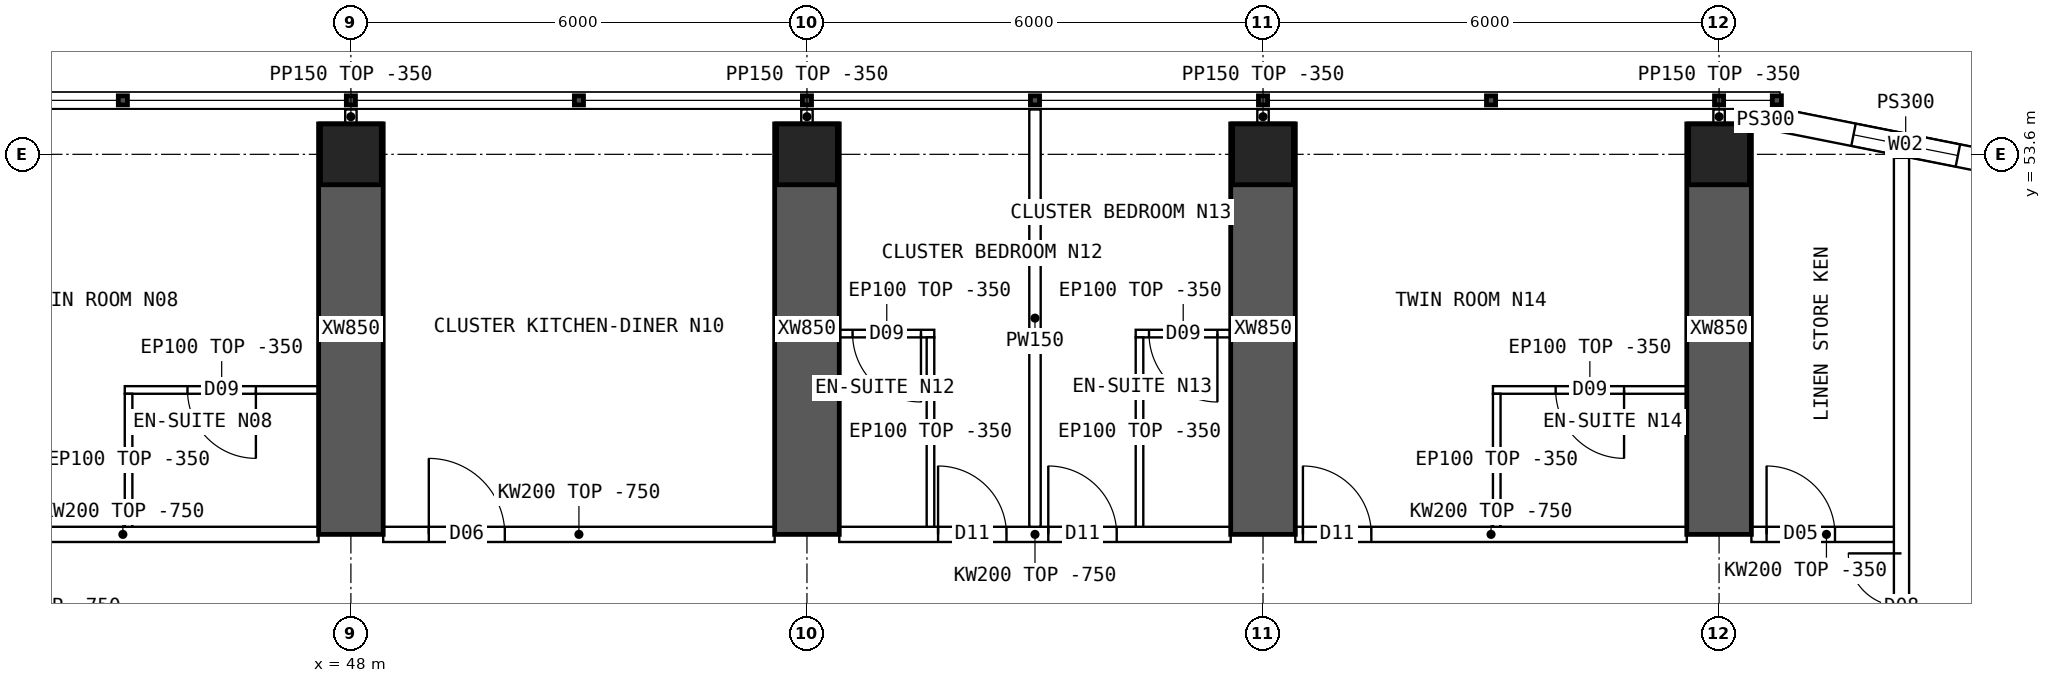
"""IFC4 building model, lengths in metres.
Left out: names, types, materials, properties, quantities, classifications, styles, units other than length and angle.
Written with IfcOpenShell. Run it as: python <this file> out.ifc"""

import sys

from ifc_helpers import new_model, si_unit, direction, frame, frame_2d, origin, origin_2d, place, context, subcontext, project, spatial, polyline, rectangle, hollow_rectangle, outline, extrude, element, fill, save


model = new_model("IFC4")
c1 = context("Model", 3, precision=1e-05, world=origin(), true_north=direction((0.0, 1.0)))
c2 = subcontext(c1, "Body", "Model", "MODEL_VIEW")
j1 = project(units=[si_unit("LENGTHUNIT", "METRE"), si_unit("PLANEANGLEUNIT", "RADIAN")], contexts=[c1])
p1 = place(None, origin())
s1 = spatial("IfcSite", under=j1, at=p1, CompositionType="ELEMENT")
p2 = place(p1, origin())
s2 = spatial("IfcBuilding", under=s1, at=p2, CompositionType="ELEMENT")
p3 = place(p2, frame((0.0, 0.0, 197.35)))
s3 = spatial("IfcBuildingStorey", under=s2, at=p3, CompositionType="ELEMENT", Elevation=197.35)
for number, where, z_axis, x_axis in (
    (1, (48.0, 53.6, 0.0), (0.0, 0.0, 1.0), (1.0, 0.0, 0.0)),
    (2, (54.0, 53.6, 0.0), (0.0, 0.0, 1.0), (1.0, 0.0, 0.0)),
    (3, (60.0, 53.6, 0.0), (0.0, 0.0, 1.0), (1.0, 0.0, 0.0)),
    (4, (66.0, 53.6, 0.0), (0.0, 0.0, 1.0), (1.0, 0.0, 0.0)),
):
    element("IfcColumn", number, at=place(p3, frame(where, z_axis=z_axis, x_axis=x_axis)), inside=s3, PredefinedType="COLUMN", context=c2, shape_type="SweptSolid", body=[
        extrude(hollow_rectangle(XDim=0.8, YDim=0.8, WallThickness=0.08, at=origin_2d()), origin(), (0.0, 0.0, 1.0), 3.75),
    ])
for number, where, z_axis, x_axis in (
    (5, (48.0, 48.6, 0.0), (0.0, 0.0, 1.0), (0.0, 1.0, 0.0)),
    (6, (54.0, 48.6, 0.0), (0.0, 0.0, 1.0), (0.0, 1.0, 0.0)),
    (7, (60.0, 48.6, 0.0), (0.0, 0.0, 1.0), (0.0, 1.0, 0.0)),
    (8, (66.0, 48.6, 0.0), (0.0, 0.0, 1.0), (0.0, 1.0, 0.0)),
):
    element("IfcWall", number, at=place(p3, frame(where, z_axis=z_axis, x_axis=x_axis)), inside=s3, PredefinedType="SHEAR", context=c2, shape_type="SweptSolid", body=[
        extrude(rectangle(XDim=5.4, YDim=0.85, at=frame_2d((2.7, 0.0))), origin(), (0.0, 0.0, 1.0), 3.75),
    ])
p4 = place(p3, frame((70.11, 53.392, 0.0), z_axis=(0.0, 0.0, 1.0), x_axis=(-0.98078325777, 0.195100490205, 0.0)))
e9 = element("IfcWall", 9, at=p4, inside=s3, PredefinedType="SOLIDWALL", context=c2, shape_type="SweptSolid", body=[
    extrude(outline(polyline([(-0.03, -0.15), (3.405, -0.15), (3.345, 0.15), (0.03, 0.15), (-0.03, -0.15)])), origin(), (0.0, 0.0, 1.0), 3.4),
])
p5 = place(p4, frame((0.988, 0.0, 0.9)))
e10 = element("IfcOpeningElement", 10, at=p5, cuts=e9, PredefinedType="OPENING", context=c2, shape_type="SweptSolid", body=[
    extrude(rectangle(XDim=1.4, YDim=1.8, at=frame_2d((0.7, 0.9))), frame((0.0, 0.16, 0.0), z_axis=(0.0, -1.0, 0.0), x_axis=(1.0, 0.0, 0.0)), (0.0, 0.0, 1.0), 0.32),
])
p6 = place(p3, frame((66.8, 54.05, 0.0), z_axis=(0.0, 0.0, 1.0), x_axis=(-1.0, 0.0, 0.0)))
e11 = element("IfcWall", 11, at=p6, inside=s3, PredefinedType="SOLIDWALL", context=c2, shape_type="SweptSolid", body=[
    extrude(rectangle(XDim=0.375, YDim=0.3, at=frame_2d((0.188, 0.0))), origin(), (0.0, 0.0, 1.0), 3.4),
])
p7 = place(p3, frame((42.425, 48.6, 0.0), z_axis=(0.0, 0.0, 1.0), x_axis=(1.0, 0.0, 0.0)))
e12 = element("IfcWall", 12, at=p7, inside=s3, PredefinedType="SOLIDWALL", context=c2, shape_type="SweptSolid", body=[
    extrude(outline(polyline([(0.0, 0.0), (5.15, 0.0), (5.15, 3.0), (0.0, 3.0), (0.0, 0.0)])), frame((0.0, 0.1, 0.0), z_axis=(0.0, -1.0, 0.0), x_axis=(1.0, 0.0, 0.0)), (0.0, 0.0, 1.0), 0.2),
])
p8 = place(p7, frame((0.1, 0.0, 0.0)))
e13 = element("IfcOpeningElement", 13, at=p8, cuts=e12, PredefinedType="OPENING", context=c2, shape_type="SweptSolid", body=[
    extrude(rectangle(XDim=0.9, YDim=2.1, at=frame_2d((0.45, 1.05))), frame((0.0, 0.11, 0.0), z_axis=(0.0, -1.0, 0.0), x_axis=(1.0, 0.0, 0.0)), (0.0, 0.0, 1.0), 0.22),
])
p9 = place(p3, frame((48.425, 48.6, 0.0), z_axis=(0.0, 0.0, 1.0), x_axis=(1.0, 0.0, 0.0)))
e14 = element("IfcWall", 14, at=p9, inside=s3, PredefinedType="SOLIDWALL", context=c2, shape_type="SweptSolid", body=[
    extrude(outline(polyline([(0.0, 0.0), (5.15, 0.0), (5.15, 3.0), (0.0, 3.0), (0.0, 0.0)])), frame((0.0, 0.1, 0.0), z_axis=(0.0, -1.0, 0.0), x_axis=(1.0, 0.0, 0.0)), (0.0, 0.0, 1.0), 0.2),
])
p10 = place(p9, frame((0.6, 0.0, 0.0)))
e15 = element("IfcOpeningElement", 15, at=p10, cuts=e14, PredefinedType="OPENING", context=c2, shape_type="SweptSolid", body=[
    extrude(rectangle(XDim=1.0, YDim=2.1, at=frame_2d((0.5, 1.05))), frame((0.0, 0.11, 0.0), z_axis=(0.0, -1.0, 0.0), x_axis=(1.0, 0.0, 0.0)), (0.0, 0.0, 1.0), 0.22),
])
p11 = place(p3, frame((54.425, 48.6, 0.0), z_axis=(0.0, 0.0, 1.0), x_axis=(1.0, 0.0, 0.0)))
e16 = element("IfcWall", 16, at=p11, inside=s3, PredefinedType="SOLIDWALL", context=c2, shape_type="SweptSolid", body=[
    extrude(outline(polyline([(0.0, 0.0), (5.15, 0.0), (5.15, 3.0), (0.0, 3.0), (0.0, 0.0)])), frame((0.0, 0.1, 0.0), z_axis=(0.0, -1.0, 0.0), x_axis=(1.0, 0.0, 0.0)), (0.0, 0.0, 1.0), 0.2),
])
p12 = place(p11, frame((1.3, 0.0, 0.0)))
e17 = element("IfcOpeningElement", 17, at=p12, cuts=e16, PredefinedType="OPENING", context=c2, shape_type="SweptSolid", body=[
    extrude(rectangle(XDim=0.9, YDim=2.1, at=frame_2d((0.45, 1.05))), frame((0.0, 0.11, 0.0), z_axis=(0.0, -1.0, 0.0), x_axis=(1.0, 0.0, 0.0)), (0.0, 0.0, 1.0), 0.22),
])
p13 = place(p11, frame((2.75, 0.0, 0.0)))
e18 = element("IfcOpeningElement", 18, at=p13, cuts=e16, PredefinedType="OPENING", context=c2, shape_type="SweptSolid", body=[
    extrude(rectangle(XDim=0.9, YDim=2.1, at=frame_2d((0.45, 1.05))), frame((0.0, 0.11, 0.0), z_axis=(0.0, -1.0, 0.0), x_axis=(1.0, 0.0, 0.0)), (0.0, 0.0, 1.0), 0.22),
])
p14 = place(p3, frame((60.425, 48.6, 0.0), z_axis=(0.0, 0.0, 1.0), x_axis=(1.0, 0.0, 0.0)))
e19 = element("IfcWall", 19, at=p14, inside=s3, PredefinedType="SOLIDWALL", context=c2, shape_type="SweptSolid", body=[
    extrude(outline(polyline([(0.0, 0.0), (5.15, 0.0), (5.15, 3.0), (0.0, 3.0), (0.0, 0.0)])), frame((0.0, 0.1, 0.0), z_axis=(0.0, -1.0, 0.0), x_axis=(1.0, 0.0, 0.0)), (0.0, 0.0, 1.0), 0.2),
])
p15 = place(p14, frame((0.1, 0.0, 0.0)))
e20 = element("IfcOpeningElement", 20, at=p15, cuts=e19, PredefinedType="OPENING", context=c2, shape_type="SweptSolid", body=[
    extrude(rectangle(XDim=0.9, YDim=2.1, at=frame_2d((0.45, 1.05))), frame((0.0, 0.11, 0.0), z_axis=(0.0, -1.0, 0.0), x_axis=(1.0, 0.0, 0.0)), (0.0, 0.0, 1.0), 0.22),
])
p16 = place(p3, frame((66.425, 48.6, 0.0), z_axis=(0.0, 0.0, 1.0), x_axis=(1.0, 0.0, 0.0)))
e21 = element("IfcWall", 21, at=p16, inside=s3, PredefinedType="SOLIDWALL", context=c2, shape_type="SweptSolid", body=[
    extrude(rectangle(XDim=1.975, YDim=0.2, at=frame_2d((0.987, 0.0))), origin(), (0.0, 0.0, 1.0), 3.4),
])
p17 = place(p16, frame((0.2, 0.0, 0.0)))
e22 = element("IfcOpeningElement", 22, at=p17, cuts=e21, PredefinedType="OPENING", context=c2, shape_type="SweptSolid", body=[
    extrude(rectangle(XDim=0.9, YDim=2.1, at=frame_2d((0.45, 1.05))), frame((0.0, 0.11, 0.0), z_axis=(0.0, -1.0, 0.0), x_axis=(1.0, 0.0, 0.0)), (0.0, 0.0, 1.0), 0.22),
])
p18 = place(p3, frame((45.025, 50.5, 0.0), z_axis=(0.0, 0.0, 1.0), x_axis=(1.0, 0.0, 0.0)))
e23 = element("IfcWall", 23, at=p18, inside=s3, PredefinedType="PARTITIONING", context=c2, shape_type="SweptSolid", body=[
    extrude(rectangle(XDim=2.55, YDim=0.1, at=frame_2d((1.275, 0.0))), origin(), (0.0, 0.0, 1.0), 3.4),
])
p19 = place(p18, frame((0.825, 0.0, 0.0)))
e24 = element("IfcOpeningElement", 24, at=p19, cuts=e23, PredefinedType="OPENING", context=c2, shape_type="SweptSolid", body=[
    extrude(rectangle(XDim=0.9, YDim=2.1, at=frame_2d((0.45, 1.05))), frame((0.0, 0.06, 0.0), z_axis=(0.0, -1.0, 0.0), x_axis=(1.0, 0.0, 0.0)), (0.0, 0.0, 1.0), 0.12),
])
p20 = place(p3, frame((45.075, 50.45, 0.0), z_axis=(0.0, 0.0, 1.0), x_axis=(0.0, -1.0, 0.0)))
e25 = element("IfcWall", 25, at=p20, inside=s3, PredefinedType="PARTITIONING", context=c2, shape_type="SweptSolid", body=[
    extrude(outline(polyline([(0.0, 0.0), (1.75, 0.0), (1.75, 3.0), (1.702, 3.0), (1.7, 3.4), (0.0, 3.4), (0.0, 0.0)])), frame((0.0, 0.05, 0.0), z_axis=(0.0, -1.0, 0.0), x_axis=(1.0, 0.0, 0.0)), (0.0, 0.0, 1.0), 0.1),
])
p21 = place(p3, frame((57.0, 54.19, 0.0), z_axis=(0.0, 0.0, 1.0), x_axis=(0.0, -1.0, 0.0)))
e26 = element("IfcWall", 26, at=p21, inside=s3, PredefinedType="PARTITIONING", context=c2, shape_type="SweptSolid", body=[
    extrude(outline(polyline([(0.0, 0.0), (5.49, 0.0), (5.49, 3.0), (5.442, 3.0), (5.44, 3.4), (0.792, 3.4), (0.79, 3.0), (0.392, 3.0), (0.39, 3.4), (0.0, 3.4), (0.0, 0.0)])), frame((0.0, 0.075, 0.0), z_axis=(0.0, -1.0, 0.0), x_axis=(1.0, 0.0, 0.0)), (0.0, 0.0, 1.0), 0.15),
])
p22 = place(p3, frame((54.425, 51.242, 0.0), z_axis=(0.0, 0.0, 1.0), x_axis=(1.0, 0.0, 0.0)))
e27 = element("IfcWall", 27, at=p22, inside=s3, PredefinedType="PARTITIONING", context=c2, shape_type="SweptSolid", body=[
    extrude(rectangle(XDim=1.25, YDim=0.1, at=frame_2d((0.625, 0.0))), origin(), (0.0, 0.0, 1.0), 3.4),
])
p23 = place(p22, frame((0.175, 0.0, 0.0)))
e28 = element("IfcOpeningElement", 28, at=p23, cuts=e27, PredefinedType="OPENING", context=c2, shape_type="SweptSolid", body=[
    extrude(rectangle(XDim=0.9, YDim=2.1, at=frame_2d((0.45, 1.05))), frame((0.0, 0.06, 0.0), z_axis=(0.0, -1.0, 0.0), x_axis=(1.0, 0.0, 0.0)), (0.0, 0.0, 1.0), 0.12),
])
p24 = place(p3, frame((55.625, 51.192, 0.0), z_axis=(0.0, 0.0, 1.0), x_axis=(0.0, -1.0, 0.0)))
e29 = element("IfcWall", 29, at=p24, inside=s3, PredefinedType="PARTITIONING", context=c2, shape_type="SweptSolid", body=[
    extrude(outline(polyline([(0.0, 0.0), (2.492, 0.0), (2.492, 3.0), (2.444, 3.0), (2.442, 3.4), (0.0, 3.4), (0.0, 0.0)])), frame((0.0, 0.05, 0.0), z_axis=(0.0, -1.0, 0.0), x_axis=(1.0, 0.0, 0.0)), (0.0, 0.0, 1.0), 0.1),
])
p25 = place(p3, frame((58.325, 51.242, 0.0), z_axis=(0.0, 0.0, 1.0), x_axis=(1.0, 0.0, 0.0)))
e30 = element("IfcWall", 30, at=p25, inside=s3, PredefinedType="PARTITIONING", context=c2, shape_type="SweptSolid", body=[
    extrude(rectangle(XDim=1.25, YDim=0.1, at=frame_2d((0.625, 0.0))), origin(), (0.0, 0.0, 1.0), 3.4),
])
p26 = place(p25, frame((0.175, 0.0, 0.0)))
e31 = element("IfcOpeningElement", 31, at=p26, cuts=e30, PredefinedType="OPENING", context=c2, shape_type="SweptSolid", body=[
    extrude(rectangle(XDim=0.9, YDim=2.1, at=frame_2d((0.45, 1.05))), frame((0.0, 0.06, 0.0), z_axis=(0.0, -1.0, 0.0), x_axis=(1.0, 0.0, 0.0)), (0.0, 0.0, 1.0), 0.12),
])
p27 = place(p3, frame((58.375, 51.192, 0.0), z_axis=(0.0, 0.0, 1.0), x_axis=(0.0, -1.0, 0.0)))
e32 = element("IfcWall", 32, at=p27, inside=s3, PredefinedType="PARTITIONING", context=c2, shape_type="SweptSolid", body=[
    extrude(outline(polyline([(0.0, 0.0), (2.492, 0.0), (2.492, 3.0), (2.444, 3.0), (2.442, 3.4), (0.0, 3.4), (0.0, 0.0)])), frame((0.0, 0.05, 0.0), z_axis=(0.0, -1.0, 0.0), x_axis=(1.0, 0.0, 0.0)), (0.0, 0.0, 1.0), 0.1),
])
p28 = place(p3, frame((63.025, 50.5, 0.0), z_axis=(0.0, 0.0, 1.0), x_axis=(1.0, 0.0, 0.0)))
e33 = element("IfcWall", 33, at=p28, inside=s3, PredefinedType="PARTITIONING", context=c2, shape_type="SweptSolid", body=[
    extrude(rectangle(XDim=2.55, YDim=0.1, at=frame_2d((1.275, 0.0))), origin(), (0.0, 0.0, 1.0), 3.4),
])
p29 = place(p28, frame((0.825, 0.0, 0.0)))
e34 = element("IfcOpeningElement", 34, at=p29, cuts=e33, PredefinedType="OPENING", context=c2, shape_type="SweptSolid", body=[
    extrude(rectangle(XDim=0.9, YDim=2.1, at=frame_2d((0.45, 1.05))), frame((0.0, 0.06, 0.0), z_axis=(0.0, -1.0, 0.0), x_axis=(1.0, 0.0, 0.0)), (0.0, 0.0, 1.0), 0.12),
])
p30 = place(p3, frame((63.075, 50.45, 0.0), z_axis=(0.0, 0.0, 1.0), x_axis=(0.0, -1.0, 0.0)))
e35 = element("IfcWall", 35, at=p30, inside=s3, PredefinedType="PARTITIONING", context=c2, shape_type="SweptSolid", body=[
    extrude(outline(polyline([(0.0, 0.0), (1.75, 0.0), (1.75, 3.0), (1.702, 3.0), (1.7, 3.4), (0.0, 3.4), (0.0, 0.0)])), frame((0.0, 0.05, 0.0), z_axis=(0.0, -1.0, 0.0), x_axis=(1.0, 0.0, 0.0)), (0.0, 0.0, 1.0), 0.1),
])
p31 = place(p3, frame((68.4, 10.446, 0.0), z_axis=(0.0, 0.0, 1.0), x_axis=(0.0, 1.0, 0.0)))
e36 = element("IfcWall", 36, at=p31, inside=s3, PredefinedType="SOLIDWALL", context=c2, shape_type="SweptSolid", body=[
    extrude(rectangle(XDim=43.107, YDim=0.2, at=frame_2d((21.554, 0.0))), origin(), (0.0, 0.0, 1.0), 3.4),
])
p32 = place(p31, frame((27.994, 0.0, 0.0)))
e37 = element("IfcOpeningElement", 37, at=p32, cuts=e36, PredefinedType="OPENING", context=c2, shape_type="SweptSolid", body=[
    extrude(rectangle(XDim=1.2, YDim=2.1, at=frame_2d((0.6, 1.05))), frame((0.0, 0.11, 0.0), z_axis=(0.0, -1.0, 0.0), x_axis=(1.0, 0.0, 0.0)), (0.0, 0.0, 1.0), 0.22),
])
p33 = place(p31, frame((5.104, 0.0, 0.0)))
e38 = element("IfcOpeningElement", 38, at=p33, cuts=e36, PredefinedType="OPENING", context=c2, shape_type="SweptSolid", body=[
    extrude(rectangle(XDim=1.4, YDim=2.1, at=frame_2d((0.7, 1.05))), frame((0.0, 0.11, 0.0), z_axis=(0.0, -1.0, 0.0), x_axis=(1.0, 0.0, 0.0)), (0.0, 0.0, 1.0), 0.22),
])
p34 = place(p31, frame((36.504, 0.0, 0.0)))
e39 = element("IfcOpeningElement", 39, at=p34, cuts=e36, PredefinedType="OPENING", context=c2, shape_type="SweptSolid", body=[
    extrude(rectangle(XDim=1.4, YDim=2.1, at=frame_2d((0.7, 1.05))), frame((0.0, 0.11, 0.0), z_axis=(0.0, -1.0, 0.0), x_axis=(1.0, 0.0, 0.0)), (0.0, 0.0, 1.0), 0.22),
])
for number, where, z_axis, x_axis in (
    (40, (48.0, 54.0, 0.0), (0.0, 0.0, 1.0), (0.0, 1.0, 0.0)),
    (41, (54.0, 54.0, 0.0), (0.0, 0.0, 1.0), (0.0, 1.0, 0.0)),
    (42, (60.0, 54.0, 0.0), (0.0, 0.0, 1.0), (0.0, 1.0, 0.0)),
    (43, (66.0, 54.0, 0.0), (0.0, 0.0, 1.0), (0.0, 1.0, 0.0)),
):
    element("IfcWall", number, at=place(p3, frame(where, z_axis=z_axis, x_axis=x_axis)), inside=s3, PredefinedType="PARTITIONING", context=c2, shape_type="SweptSolid", body=[
        extrude(rectangle(XDim=0.19, YDim=0.15, at=frame_2d((0.095, 0.0))), origin(), (0.0, 0.0, 1.0), 3.4),
    ])
p35 = place(p5, origin())
e44 = element("IfcWindow", 44, at=p35, inside=s3, PartitioningType="SINGLE_PANEL", PredefinedType="WINDOW", context=c2, shape_type="SweptSolid", body=[
    extrude(rectangle(XDim=1.4, YDim=1.8, at=frame_2d((0.7, 0.9))), frame((0.0, 0.03, 0.0), z_axis=(0.0, -1.0, 0.0), x_axis=(1.0, 0.0, 0.0)), (0.0, 0.0, 1.0), 0.06),
])
fill(e10, e44)
p36 = place(p19, origin())
e45 = element("IfcDoor", 45, at=p36, inside=s3, OperationType="SINGLE_SWING_RIGHT", PredefinedType="DOOR", context=c2, shape_type="SweptSolid", body=[
    extrude(rectangle(XDim=0.9, YDim=2.1, at=frame_2d((0.45, 1.05))), frame((0.0, 0.025, 0.0), z_axis=(0.0, -1.0, 0.0), x_axis=(1.0, 0.0, 0.0)), (0.0, 0.0, 1.0), 0.05),
])
fill(e24, e45)
p37 = place(p10, origin())
e46 = element("IfcDoor", 46, at=p37, inside=s3, OperationType="SINGLE_SWING_LEFT", PredefinedType="DOOR", context=c2, shape_type="SweptSolid", body=[
    extrude(rectangle(XDim=1.0, YDim=2.1, at=frame_2d((0.5, 1.05))), frame((0.0, 0.025, 0.0), z_axis=(0.0, -1.0, 0.0), x_axis=(1.0, 0.0, 0.0)), (0.0, 0.0, 1.0), 0.05),
])
fill(e15, e46)
p38 = place(p23, origin())
e47 = element("IfcDoor", 47, at=p38, inside=s3, OperationType="SINGLE_SWING_RIGHT", PredefinedType="DOOR", context=c2, shape_type="SweptSolid", body=[
    extrude(rectangle(XDim=0.9, YDim=2.1, at=frame_2d((0.45, 1.05))), frame((0.0, 0.025, 0.0), z_axis=(0.0, -1.0, 0.0), x_axis=(1.0, 0.0, 0.0)), (0.0, 0.0, 1.0), 0.05),
])
fill(e28, e47)
p39 = place(p12, origin())
e48 = element("IfcDoor", 48, at=p39, inside=s3, OperationType="SINGLE_SWING_LEFT", PredefinedType="DOOR", context=c2, shape_type="SweptSolid", body=[
    extrude(rectangle(XDim=0.9, YDim=2.1, at=frame_2d((0.45, 1.05))), frame((0.0, 0.025, 0.0), z_axis=(0.0, -1.0, 0.0), x_axis=(1.0, 0.0, 0.0)), (0.0, 0.0, 1.0), 0.05),
])
fill(e17, e48)
p40 = place(p26, origin())
e49 = element("IfcDoor", 49, at=p40, inside=s3, OperationType="SINGLE_SWING_RIGHT", PredefinedType="DOOR", context=c2, shape_type="SweptSolid", body=[
    extrude(rectangle(XDim=0.9, YDim=2.1, at=frame_2d((0.45, 1.05))), frame((0.0, 0.025, 0.0), z_axis=(0.0, -1.0, 0.0), x_axis=(1.0, 0.0, 0.0)), (0.0, 0.0, 1.0), 0.05),
])
fill(e31, e49)
p41 = place(p13, origin())
e50 = element("IfcDoor", 50, at=p41, inside=s3, OperationType="SINGLE_SWING_LEFT", PredefinedType="DOOR", context=c2, shape_type="SweptSolid", body=[
    extrude(rectangle(XDim=0.9, YDim=2.1, at=frame_2d((0.45, 1.05))), frame((0.0, 0.025, 0.0), z_axis=(0.0, -1.0, 0.0), x_axis=(1.0, 0.0, 0.0)), (0.0, 0.0, 1.0), 0.05),
])
fill(e18, e50)
p42 = place(p29, origin())
e51 = element("IfcDoor", 51, at=p42, inside=s3, OperationType="SINGLE_SWING_RIGHT", PredefinedType="DOOR", context=c2, shape_type="SweptSolid", body=[
    extrude(rectangle(XDim=0.9, YDim=2.1, at=frame_2d((0.45, 1.05))), frame((0.0, 0.025, 0.0), z_axis=(0.0, -1.0, 0.0), x_axis=(1.0, 0.0, 0.0)), (0.0, 0.0, 1.0), 0.05),
])
fill(e34, e51)
p43 = place(p15, origin())
e52 = element("IfcDoor", 52, at=p43, inside=s3, OperationType="SINGLE_SWING_LEFT", PredefinedType="DOOR", context=c2, shape_type="SweptSolid", body=[
    extrude(rectangle(XDim=0.9, YDim=2.1, at=frame_2d((0.45, 1.05))), frame((0.0, 0.025, 0.0), z_axis=(0.0, -1.0, 0.0), x_axis=(1.0, 0.0, 0.0)), (0.0, 0.0, 1.0), 0.05),
])
fill(e20, e52)
p44 = place(p34, origin())
e53 = element("IfcDoor", 53, at=p44, inside=s3, OperationType="DOUBLE_DOOR_SINGLE_SWING", PredefinedType="DOOR", context=c2, shape_type="SweptSolid", body=[
    extrude(rectangle(XDim=1.4, YDim=2.1, at=frame_2d((0.7, 1.05))), frame((0.0, 0.025, 0.0), z_axis=(0.0, -1.0, 0.0), x_axis=(1.0, 0.0, 0.0)), (0.0, 0.0, 1.0), 0.05),
])
fill(e39, e53)
p45 = place(p17, origin())
e54 = element("IfcDoor", 54, at=p45, inside=s3, OperationType="SINGLE_SWING_LEFT", PredefinedType="DOOR", context=c2, shape_type="SweptSolid", body=[
    extrude(rectangle(XDim=0.9, YDim=2.1, at=frame_2d((0.45, 1.05))), frame((0.0, 0.025, 0.0), z_axis=(0.0, -1.0, 0.0), x_axis=(1.0, 0.0, 0.0)), (0.0, 0.0, 1.0), 0.05),
])
fill(e22, e54)
save(model, sys.argv[1])
